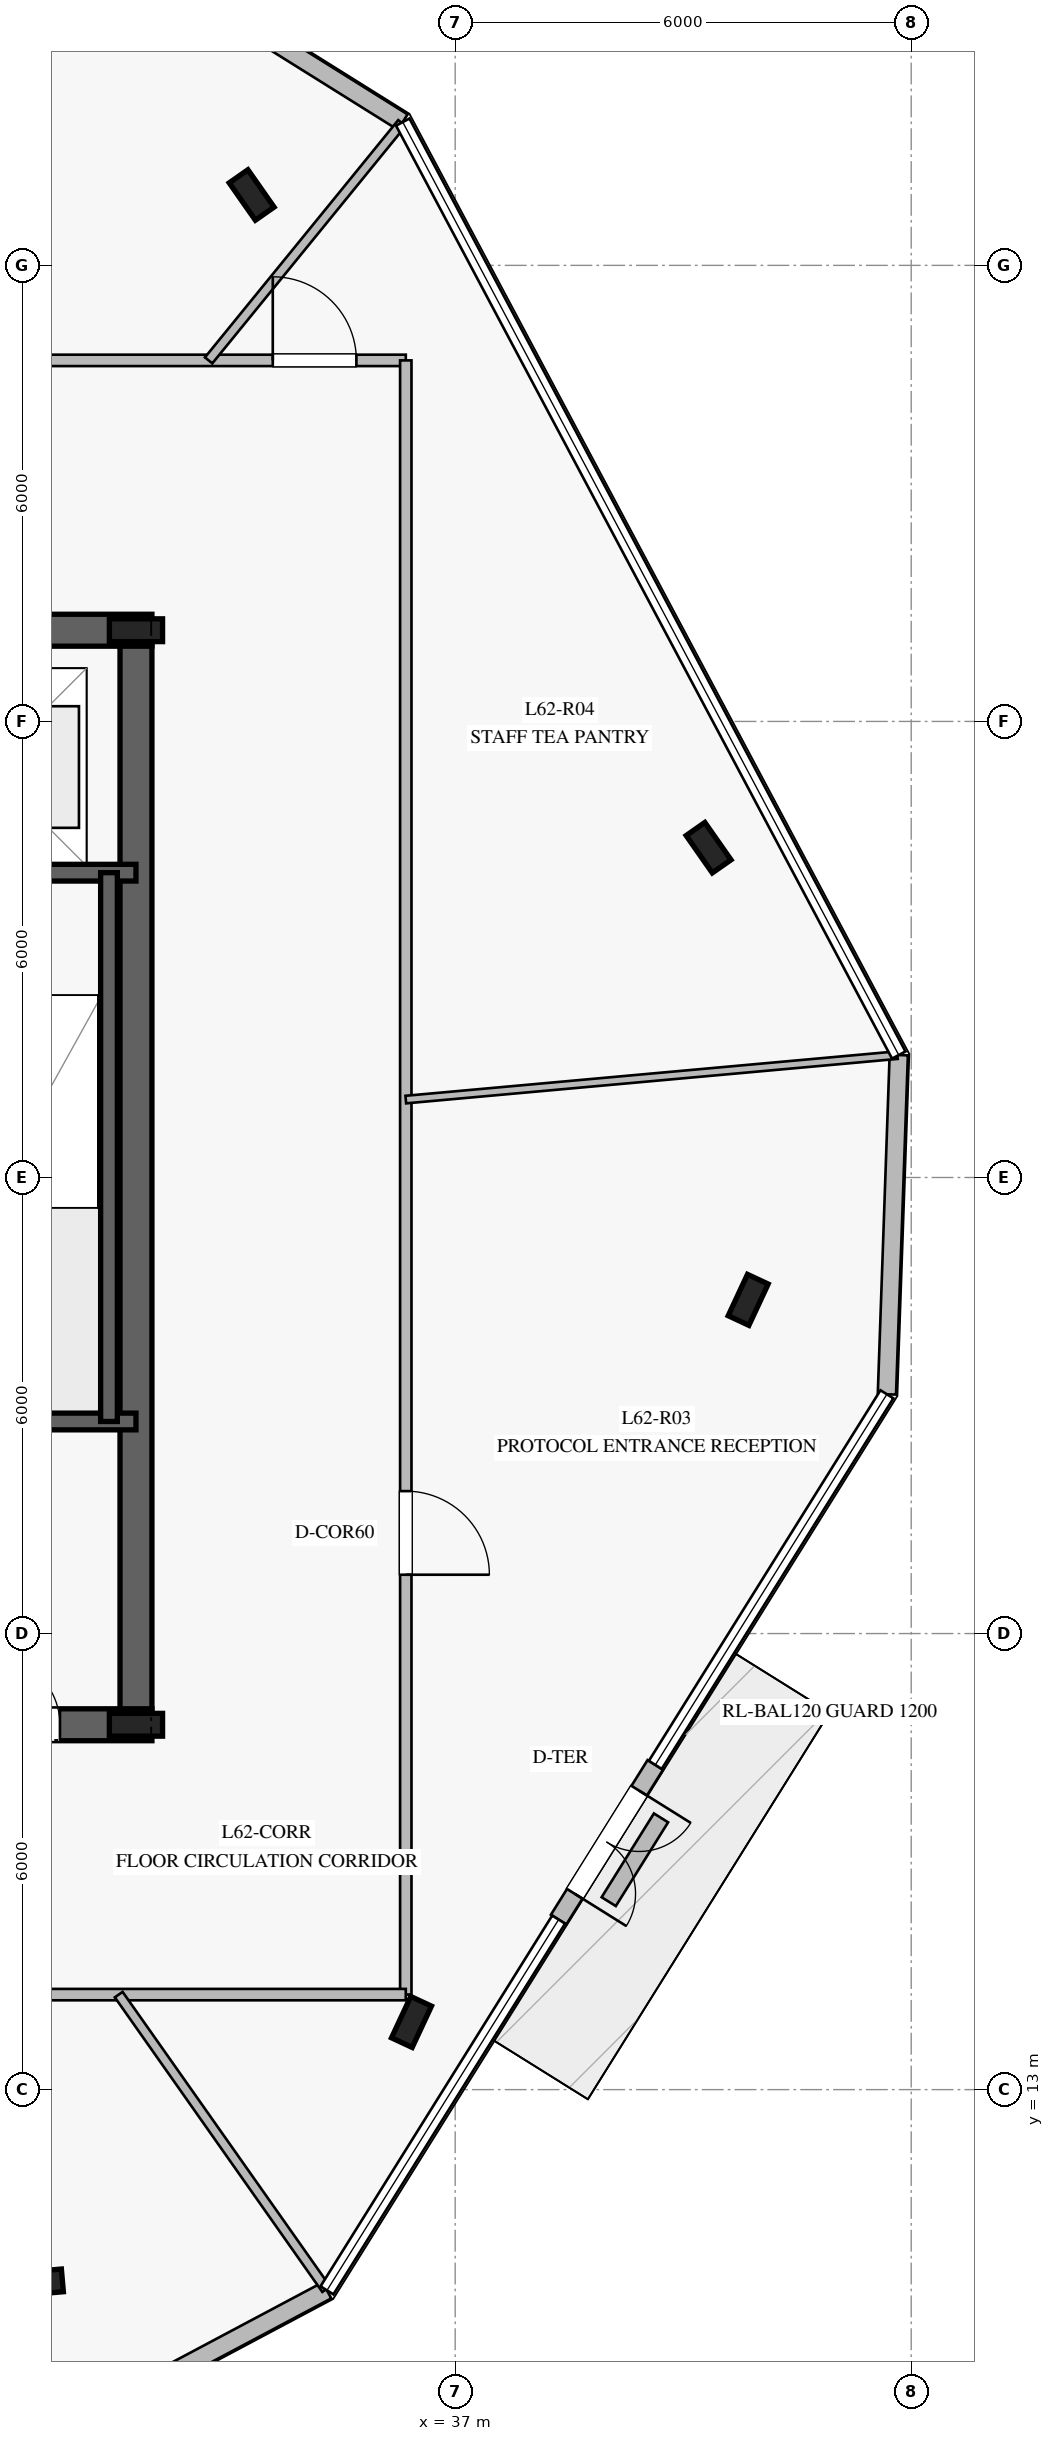
"""IFC4 building model, lengths in metres.
Left out: names, types, materials, properties, quantities, classifications, styles, units other than length and angle.
Written with IfcOpenShell. Run it as: python <this file> out.ifc"""

import sys

from ifc_helpers import new_model, si_unit, direction, frame, frame_2d, origin, origin_2d, place, context, subcontext, project, spatial, rectangle, i_section, extrude, element, fill, save


model = new_model("IFC4")
c1 = context("Model", 3, precision=1e-05, world=origin(), true_north=direction((0.0, 1.0)))
c2 = subcontext(c1, "Body", "Model", "MODEL_VIEW")
j1 = project(units=[si_unit("LENGTHUNIT", "METRE"), si_unit("PLANEANGLEUNIT", "RADIAN")], contexts=[c1])
p1 = place(None, origin())
s1 = spatial("IfcSite", under=j1, at=p1, CompositionType="ELEMENT")
p2 = place(p1, origin())
s2 = spatial("IfcBuilding", under=s1, at=p2, CompositionType="ELEMENT")
p3 = place(p2, frame((0.0, 0.0, 258.2)))
s3 = spatial("IfcBuildingStorey", under=s2, at=p3, CompositionType="ELEMENT", Elevation=258.2)
p4 = place(p3, frame((16.99, 17.8, 0.0), z_axis=(0.0, 0.0, 1.0), x_axis=(1.0, 0.0, 0.0)))
e1 = element("IfcWall", 1, at=p4, inside=s3, PredefinedType="SHEAR", context=c2, shape_type="SweptSolid", body=[
    extrude(rectangle(XDim=16.02, YDim=0.42, at=frame_2d((8.01, 0.0))), origin(), (0.0, 0.0, 1.0), 3.78),
])
p5 = place(p4, frame((4.96, 0.0, 0.0)))
e2 = element("IfcOpeningElement", 2, at=p5, cuts=e1, PredefinedType="OPENING", context=c2, shape_type="SweptSolid", body=[
    extrude(rectangle(XDim=1.2, YDim=2.25, at=frame_2d((0.6, 1.125))), frame((0.0, 0.22, 0.0), z_axis=(0.0, -1.0, 0.0), x_axis=(1.0, 0.0, 0.0)), (0.0, 0.0, 1.0), 0.44),
])
p6 = place(p4, frame((13.91, 0.0, 0.0)))
e3 = element("IfcOpeningElement", 3, at=p6, cuts=e1, PredefinedType="OPENING", context=c2, shape_type="SweptSolid", body=[
    extrude(rectangle(XDim=0.9, YDim=2.1, at=frame_2d((0.45, 1.05))), frame((0.0, 0.22, 0.0), z_axis=(0.0, -1.0, 0.0), x_axis=(1.0, 0.0, 0.0)), (0.0, 0.0, 1.0), 0.44),
])
p7 = place(p4, frame((9.16, 0.0, 0.0)))
e4 = element("IfcOpeningElement", 4, at=p7, cuts=e1, PredefinedType="OPENING", context=c2, shape_type="SweptSolid", body=[
    extrude(rectangle(XDim=1.1, YDim=2.2, at=frame_2d((0.55, 1.1))), frame((0.0, 0.22, 0.0), z_axis=(0.0, -1.0, 0.0), x_axis=(1.0, 0.0, 0.0)), (0.0, 0.0, 1.0), 0.44),
])
p8 = place(p3, frame((33.01, 32.2, 0.0), z_axis=(0.0, 0.0, 1.0), x_axis=(-1.0, 0.0, 0.0)))
e5 = element("IfcWall", 5, at=p8, inside=s3, PredefinedType="SHEAR", context=c2, shape_type="SweptSolid", body=[
    extrude(rectangle(XDim=16.02, YDim=0.42, at=frame_2d((8.01, 0.0))), origin(), (0.0, 0.0, 1.0), 3.78),
])
p9 = place(p8, frame((4.96, 0.0, 0.0)))
e6 = element("IfcOpeningElement", 6, at=p9, cuts=e5, PredefinedType="OPENING", context=c2, shape_type="SweptSolid", body=[
    extrude(rectangle(XDim=1.2, YDim=2.25, at=frame_2d((0.6, 1.125))), frame((0.0, 0.22, 0.0), z_axis=(0.0, -1.0, 0.0), x_axis=(1.0, 0.0, 0.0)), (0.0, 0.0, 1.0), 0.44),
])
p10 = place(p8, frame((9.785, 0.0, 0.0)))
e7 = element("IfcOpeningElement", 7, at=p10, cuts=e5, PredefinedType="OPENING", context=c2, shape_type="SweptSolid", body=[
    extrude(rectangle(XDim=1.1, YDim=2.2, at=frame_2d((0.55, 1.1))), frame((0.0, 0.22, 0.0), z_axis=(0.0, -1.0, 0.0), x_axis=(1.0, 0.0, 0.0)), (0.0, 0.0, 1.0), 0.44),
])
p11 = place(p3, frame((32.8, 18.01, 0.0), z_axis=(0.0, 0.0, 1.0), x_axis=(0.0, 1.0, 0.0)))
e8 = element("IfcWall", 8, at=p11, inside=s3, PredefinedType="SHEAR", context=c2, shape_type="SweptSolid", body=[
    extrude(rectangle(XDim=13.98, YDim=0.42, at=frame_2d((6.99, 0.0))), origin(), (0.0, 0.0, 1.0), 3.78),
])
for number, where, z_axis, x_axis in (
    (9, (32.8, 17.8, 0.0), (0.0, 0.0, 1.0), (1.0, 0.0, 0.0)),
    (10, (32.8, 32.2, 0.0), (0.0, 0.0, 1.0), (1.0, 0.0, 0.0)),
):
    element("IfcColumn", number, at=place(p3, frame(where, z_axis=z_axis, x_axis=x_axis)), inside=s3, PredefinedType="COLUMN", context=c2, shape_type="SweptSolid", body=[
        extrude(i_section(OverallWidth=0.3, OverallDepth=0.7, WebThickness=0.017, FlangeThickness=0.032, at=origin_2d()), origin(), (0.0, 0.0, 1.0), 4.0),
    ])
for number, where, z_axis, x_axis in (
    (11, (29.08, 21.79, 0.0), (0.0, 0.0, 1.0), (1.0, 0.0, 0.0)),
    (12, (29.08, 29.01, 0.0), (0.0, 0.0, 1.0), (1.0, 0.0, 0.0)),
):
    element("IfcWall", number, at=place(p3, frame(where, z_axis=z_axis, x_axis=x_axis)), inside=s3, PredefinedType="SOLIDWALL", context=c2, shape_type="SweptSolid", body=[
        extrude(rectangle(XDim=3.72, YDim=0.22, at=frame_2d((1.86, 0.0))), origin(), (0.0, 0.0, 1.0), 3.78),
    ])
p12 = place(p3, frame((32.445, 29.01, 0.0), z_axis=(0.0, 0.0, 1.0), x_axis=(0.0, -1.0, 0.0)))
e13 = element("IfcWall", 13, at=p12, inside=s3, PredefinedType="SOLIDWALL", context=c2, shape_type="SweptSolid", body=[
    extrude(rectangle(XDim=7.22, YDim=0.22, at=frame_2d((3.61, 0.0))), origin(), (0.0, 0.0, 1.0), 3.78),
])
for number, where, z_axis, x_axis in (
    (14, (31.533, 10.464, 0.0), (0.0, 0.0, 1.0), (0.996, 0.087, 0.0)),
    (15, (36.425, 13.89, 0.0), (0.0, 0.0, 1.0), (0.423, 0.906, 0.0)),
    (16, (40.855, 23.39, 0.0), (0.0, 0.0, 1.0), (0.423, 0.906, 0.0)),
    (17, (40.334, 29.339, 0.0), (0.0, 0.0, 1.0), (-0.574, 0.819, 0.0)),
    (18, (34.322, 37.926, 0.0), (0.0, 0.0, 1.0), (-0.574, 0.819, 0.0)),
):
    element("IfcColumn", number, at=place(p3, frame(where, z_axis=z_axis, x_axis=x_axis)), inside=s3, PredefinedType="COLUMN", context=c2, shape_type="SweptSolid", body=[
        extrude(i_section(OverallWidth=0.3, OverallDepth=0.6, WebThickness=0.015, FlangeThickness=0.03, at=origin_2d()), origin(), (0.0, 0.0, 1.0), 4.0),
    ])
p13 = place(p3, frame((31.371, 8.263, 0.0), z_axis=(0.0, 0.0, 1.0), x_axis=(0.88294715046, 0.469472394816, 0.0)))
e19 = element("IfcWall", 19, at=p13, inside=s3, PredefinedType="STANDARD", context=c2, shape_type="SweptSolid", body=[
    extrude(rectangle(XDim=4.464, YDim=0.24, at=frame_2d((2.232, 0.0))), origin(), (0.0, 0.0, 1.0), 3.78),
])
p14 = place(p3, frame((38.361, 15.237, 0.0), z_axis=(0.0, 0.0, 1.0), x_axis=(0.530044663287, 0.847969725239, 0.0)))
e20 = element("IfcWall", 20, at=p14, inside=s3, PredefinedType="STANDARD", context=c2, shape_type="SweptSolid", body=[
    extrude(rectangle(XDim=2.4, YDim=0.24, at=frame_2d((1.2, 0.0))), origin(), (0.0, 0.0, 1.0), 3.78),
])
p15 = place(p14, frame((0.4, 0.0, 0.0)))
e21 = element("IfcOpeningElement", 21, at=p15, cuts=e20, PredefinedType="OPENING", context=c2, shape_type="SweptSolid", body=[
    extrude(rectangle(XDim=1.6, YDim=2.25, at=frame_2d((0.8, 1.125))), frame((0.0, 0.13, 0.0), z_axis=(0.0, -1.0, 0.0), x_axis=(1.0, 0.0, 0.0)), (0.0, 0.0, 1.0), 0.26),
])
for number, where, z_axis, x_axis in (
    (22, (42.68, 22.148, 0.0), (0.0, 0.0, 1.0), (0.035, 0.999, 0.0)),
    (23, (36.31, 38.885, 0.0), (0.0, 0.0, 1.0), (-0.848, 0.53, 0.0)),
):
    element("IfcWall", number, at=place(p3, frame(where, z_axis=z_axis, x_axis=x_axis)), inside=s3, PredefinedType="STANDARD", context=c2, shape_type="SweptSolid", body=[
        extrude(rectangle(XDim=4.466, YDim=0.24, at=frame_2d((2.233, 0.0))), origin(), (0.0, 0.0, 1.0), 3.78),
    ])
p16 = place(p3, frame((39.02, 15.473, 0.0), z_axis=(0.0, 0.0, 1.0), x_axis=(0.52955968417, 0.848272680747, 0.0)))
e24 = element("IfcWall", 24, at=p16, inside=s3, PredefinedType="USERDEFINED", context=c2, shape_type="SweptSolid", body=[
    extrude(rectangle(XDim=1.299, YDim=0.22, at=frame_2d((0.649, 0.0))), origin(), (0.0, 0.0, 1.0), 0.4),
])
p17 = place(p3, frame((13.65, 35.75, 0.0), z_axis=(0.0, 0.0, 1.0), x_axis=(1.0, 0.0, 0.0)))
e25 = element("IfcWall", 25, at=p17, inside=s3, PredefinedType="PARTITIONING", context=c2, shape_type="SweptSolid", body=[
    extrude(rectangle(XDim=22.7, YDim=0.15, at=frame_2d((11.35, 0.0))), origin(), (0.0, 0.0, 1.0), 3.28),
])
p18 = place(p17, frame((20.95, 0.0, 0.0)))
e26 = element("IfcOpeningElement", 26, at=p18, cuts=e25, PredefinedType="OPENING", context=c2, shape_type="SweptSolid", body=[
    extrude(rectangle(XDim=1.1, YDim=2.2, at=frame_2d((0.55, 1.1))), frame((0.0, 0.085, 0.0), z_axis=(0.0, -1.0, 0.0), x_axis=(1.0, 0.0, 0.0)), (0.0, 0.0, 1.0), 0.17),
])
p19 = place(p17, frame((14.644, 0.0, 0.0)))
e27 = element("IfcOpeningElement", 27, at=p19, cuts=e25, PredefinedType="OPENING", context=c2, shape_type="SweptSolid", body=[
    extrude(rectangle(XDim=1.1, YDim=2.2, at=frame_2d((0.55, 1.1))), frame((0.0, 0.085, 0.0), z_axis=(0.0, -1.0, 0.0), x_axis=(1.0, 0.0, 0.0)), (0.0, 0.0, 1.0), 0.17),
])
p20 = place(p17, frame((4.649, 0.0, 0.0)))
e28 = element("IfcOpeningElement", 28, at=p20, cuts=e25, PredefinedType="OPENING", context=c2, shape_type="SweptSolid", body=[
    extrude(rectangle(XDim=1.1, YDim=2.2, at=frame_2d((0.55, 1.1))), frame((0.0, 0.085, 0.0), z_axis=(0.0, -1.0, 0.0), x_axis=(1.0, 0.0, 0.0)), (0.0, 0.0, 1.0), 0.17),
])
p21 = place(p3, frame((36.35, 35.75, 0.0), z_axis=(0.0, 0.0, 1.0), x_axis=(0.0, -1.0, 0.0)))
e29 = element("IfcWall", 29, at=p21, inside=s3, PredefinedType="PARTITIONING", context=c2, shape_type="SweptSolid", body=[
    extrude(rectangle(XDim=21.5, YDim=0.15, at=frame_2d((10.75, 0.0))), origin(), (0.0, 0.0, 1.0), 3.25),
])
p22 = place(p21, frame((14.876, 0.0, 0.0)))
e30 = element("IfcOpeningElement", 30, at=p22, cuts=e29, PredefinedType="OPENING", context=c2, shape_type="SweptSolid", body=[
    extrude(rectangle(XDim=1.1, YDim=2.2, at=frame_2d((0.55, 1.1))), frame((0.0, 0.085, 0.0), z_axis=(0.0, -1.0, 0.0), x_axis=(1.0, 0.0, 0.0)), (0.0, 0.0, 1.0), 0.17),
])
p23 = place(p3, frame((36.35, 14.25, 0.0), z_axis=(0.0, 0.0, 1.0), x_axis=(-1.0, 0.0, 0.0)))
e31 = element("IfcWall", 31, at=p23, inside=s3, PredefinedType="PARTITIONING", context=c2, shape_type="SweptSolid", body=[
    extrude(rectangle(XDim=22.7, YDim=0.15, at=frame_2d((11.35, 0.0))), origin(), (0.0, 0.0, 1.0), 3.28),
])
p24 = place(p23, frame((17.718, 0.0, 0.0)))
e32 = element("IfcOpeningElement", 32, at=p24, cuts=e31, PredefinedType="OPENING", context=c2, shape_type="SweptSolid", body=[
    extrude(rectangle(XDim=1.1, YDim=2.2, at=frame_2d((0.55, 1.1))), frame((0.0, 0.085, 0.0), z_axis=(0.0, -1.0, 0.0), x_axis=(1.0, 0.0, 0.0)), (0.0, 0.0, 1.0), 0.17),
])
p25 = place(p23, frame((8.322, 0.0, 0.0)))
e33 = element("IfcOpeningElement", 33, at=p25, cuts=e31, PredefinedType="OPENING", context=c2, shape_type="SweptSolid", body=[
    extrude(rectangle(XDim=1.1, YDim=2.2, at=frame_2d((0.55, 1.1))), frame((0.0, 0.085, 0.0), z_axis=(0.0, -1.0, 0.0), x_axis=(1.0, 0.0, 0.0)), (0.0, 0.0, 1.0), 0.17),
])
p26 = place(p3, frame((32.573, 14.25, 0.0), z_axis=(0.0, 0.0, 1.0), x_axis=(0.575837769847, -0.817563980871, 0.0)))
e34 = element("IfcWall", 34, at=p26, inside=s3, PredefinedType="PARTITIONING", context=c2, shape_type="SweptSolid", body=[
    extrude(rectangle(XDim=4.741, YDim=0.125, at=frame_2d((2.371, 0.0))), origin(), (0.0, 0.0, 1.0), 3.28),
])
p27 = place(p3, frame((36.35, 26.025, 0.0), z_axis=(0.0, 0.0, 1.0), x_axis=(0.995931939697, 0.09010866491, 0.0)))
e35 = element("IfcWall", 35, at=p27, inside=s3, PredefinedType="MOVABLE", context=c2, shape_type="SweptSolid", body=[
    extrude(rectangle(XDim=6.494, YDim=0.1, at=frame_2d((3.247, 0.0))), origin(), (0.0, 0.0, 1.0), 3.28),
])
p28 = place(p3, frame((33.756, 35.75, 0.0), z_axis=(0.0, 0.0, 1.0), x_axis=(0.631532584773, 0.775349336989, 0.0)))
e36 = element("IfcWall", 36, at=p28, inside=s3, PredefinedType="PARTITIONING", context=c2, shape_type="SweptSolid", body=[
    extrude(rectangle(XDim=4.027, YDim=0.125, at=frame_2d((2.013, 0.0))), origin(), (0.0, 0.0, 1.0), 3.28),
])
p29 = place(p15, frame((1.6, 0.0, 0.0), z_axis=(0.0, 0.0, 1.0), x_axis=(-1.0, 0.0, 0.0)))
e37 = element("IfcDoor", 37, at=p29, inside=s3, OperationType="DOUBLE_DOOR_SINGLE_SWING", PredefinedType="DOOR", context=c2, shape_type="SweptSolid", body=[
    extrude(rectangle(XDim=1.6, YDim=2.25, at=frame_2d((0.8, 1.125))), frame((0.0, 0.025, 0.0), z_axis=(0.0, -1.0, 0.0), x_axis=(1.0, 0.0, 0.0)), (0.0, 0.0, 1.0), 0.05),
])
fill(e21, e37)
p30 = place(p6, origin())
e38 = element("IfcDoor", 38, at=p30, inside=s3, OperationType="SINGLE_SWING_LEFT", PredefinedType="DOOR", context=c2, shape_type="SweptSolid", body=[
    extrude(rectangle(XDim=0.9, YDim=2.1, at=frame_2d((0.45, 1.05))), frame((0.0, 0.025, 0.0), z_axis=(0.0, -1.0, 0.0), x_axis=(1.0, 0.0, 0.0)), (0.0, 0.0, 1.0), 0.05),
])
fill(e3, e38)
p31 = place(p22, origin())
e39 = element("IfcDoor", 39, at=p31, inside=s3, OperationType="SINGLE_SWING_RIGHT", PredefinedType="DOOR", context=c2, shape_type="SweptSolid", body=[
    extrude(rectangle(XDim=1.1, YDim=2.2, at=frame_2d((0.55, 1.1))), frame((0.0, 0.025, 0.0), z_axis=(0.0, -1.0, 0.0), x_axis=(1.0, 0.0, 0.0)), (0.0, 0.0, 1.0), 0.05),
])
fill(e30, e39)
p32 = place(p18, origin())
e40 = element("IfcDoor", 40, at=p32, inside=s3, OperationType="SINGLE_SWING_LEFT", PredefinedType="DOOR", context=c2, shape_type="SweptSolid", body=[
    extrude(rectangle(XDim=1.1, YDim=2.2, at=frame_2d((0.55, 1.1))), frame((0.0, 0.025, 0.0), z_axis=(0.0, -1.0, 0.0), x_axis=(1.0, 0.0, 0.0)), (0.0, 0.0, 1.0), 0.05),
])
fill(e26, e40)
save(model, sys.argv[1])
